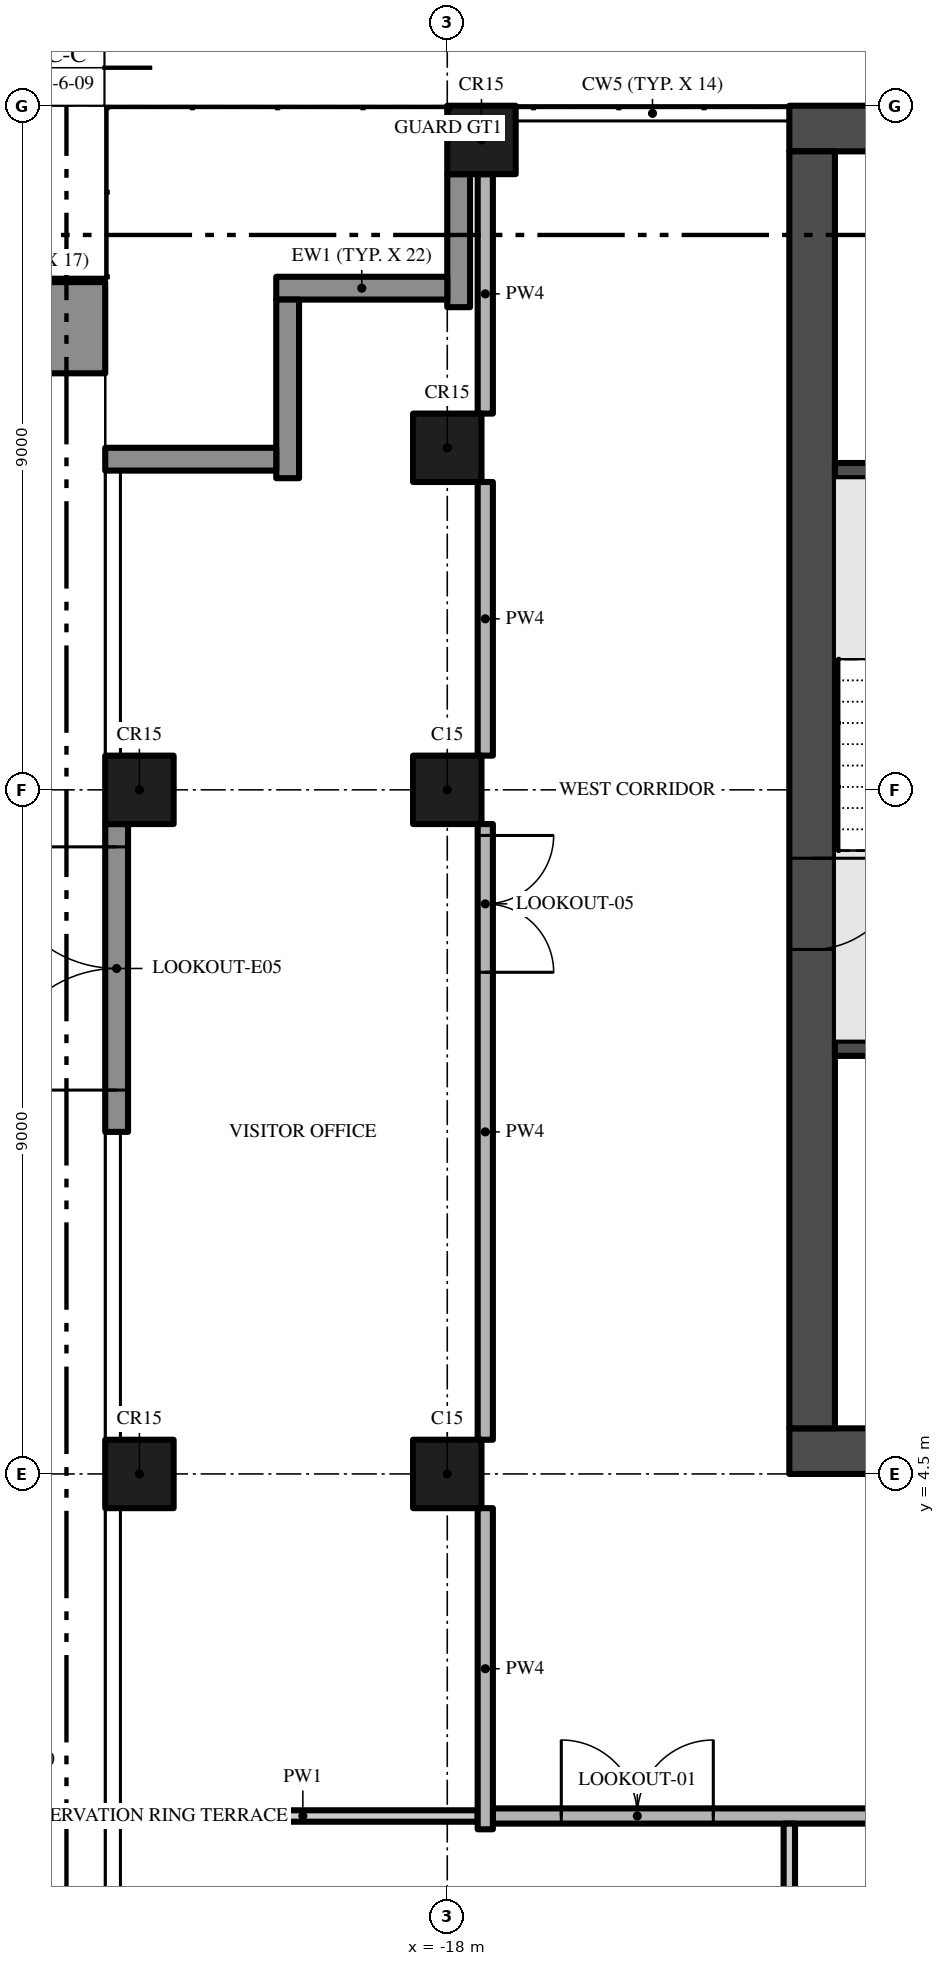
"""IFC4 building model, lengths in metres.
Left out: names, types, materials, properties, quantities, classifications, styles, units other than length and angle.
Written with IfcOpenShell. Run it as: python <this file> out.ifc"""

import sys

from ifc_helpers import new_model, si_unit, direction, frame, frame_2d, origin, origin_2d, place, context, subcontext, project, spatial, rectangle, extrude, element, fill, save


model = new_model("IFC4")
c1 = context("Model", 3, precision=1e-05, world=origin(), true_north=direction((0.0, 1.0)))
c2 = subcontext(c1, "Body", "Model", "MODEL_VIEW")
j1 = project(units=[si_unit("LENGTHUNIT", "METRE"), si_unit("PLANEANGLEUNIT", "RADIAN")], contexts=[c1])
p1 = place(None, origin())
s1 = spatial("IfcSite", under=j1, at=p1, CompositionType="ELEMENT")
p2 = place(p1, origin())
s2 = spatial("IfcBuilding", under=s1, at=p2, CompositionType="ELEMENT")
p3 = place(p2, frame((0.0, 0.0, 297.4)))
s3 = spatial("IfcBuildingStorey", under=s2, at=p3, CompositionType="ELEMENT", Elevation=297.4)
p4 = place(p3, frame((-13.5, 4.8, -0.3), z_axis=(0.0, 0.0, 1.0), x_axis=(1.0, 0.0, 0.0)))
e1 = element("IfcWall", 1, at=p4, inside=s3, PredefinedType="SHEAR", context=c2, shape_type="SweptSolid", body=[
    extrude(rectangle(XDim=27.0, YDim=0.6, at=frame_2d((13.5, 0.0))), origin(), (0.0, 0.0, 1.0), 5.95),
])
p5 = place(p4, frame((12.0, 0.0, 0.3)))
e2 = element("IfcOpeningElement", 2, at=p5, cuts=e1, PredefinedType="OPENING", context=c2, shape_type="SweptSolid", body=[
    extrude(rectangle(XDim=3.0, YDim=2.4, at=frame_2d((1.5, 1.2))), frame((0.0, 0.31, 0.0), z_axis=(0.0, -1.0, 0.0), x_axis=(1.0, 0.0, 0.0)), (0.0, 0.0, 1.0), 0.62),
])
p6 = place(p4, frame((4.9, 0.0, 0.3)))
e3 = element("IfcOpeningElement", 3, at=p6, cuts=e1, PredefinedType="OPENING", context=c2, shape_type="SweptSolid", body=[
    extrude(rectangle(XDim=1.2, YDim=2.2, at=frame_2d((0.6, 1.1))), frame((0.0, 0.31, 0.0), z_axis=(0.0, -1.0, 0.0), x_axis=(1.0, 0.0, 0.0)), (0.0, 0.0, 1.0), 0.62),
])
p7 = place(p4, frame((20.75, 0.0, 0.3)))
e4 = element("IfcOpeningElement", 4, at=p7, cuts=e1, PredefinedType="OPENING", context=c2, shape_type="SweptSolid", body=[
    extrude(rectangle(XDim=1.5, YDim=2.2, at=frame_2d((0.75, 1.1))), frame((0.0, 0.31, 0.0), z_axis=(0.0, -1.0, 0.0), x_axis=(1.0, 0.0, 0.0)), (0.0, 0.0, 1.0), 0.62),
])
p8 = place(p4, frame((17.4, 0.0, 0.3)))
e5 = element("IfcOpeningElement", 5, at=p8, cuts=e1, PredefinedType="OPENING", context=c2, shape_type="SweptSolid", body=[
    extrude(rectangle(XDim=1.2, YDim=2.2, at=frame_2d((0.6, 1.1))), frame((0.0, 0.31, 0.0), z_axis=(0.0, -1.0, 0.0), x_axis=(1.0, 0.0, 0.0)), (0.0, 0.0, 1.0), 0.62),
])
p9 = place(p3, frame((13.5, 22.2, -0.3), z_axis=(0.0, 0.0, 1.0), x_axis=(-1.0, 0.0, 0.0)))
e6 = element("IfcWall", 6, at=p9, inside=s3, PredefinedType="SHEAR", context=c2, shape_type="SweptSolid", body=[
    extrude(rectangle(XDim=27.0, YDim=0.6, at=frame_2d((13.5, 0.0))), origin(), (0.0, 0.0, 1.0), 5.95),
])
p10 = place(p3, frame((-13.2, 21.9, -0.3), z_axis=(0.0, 0.0, 1.0), x_axis=(0.0, -1.0, 0.0)))
e7 = element("IfcWall", 7, at=p10, inside=s3, PredefinedType="SHEAR", context=c2, shape_type="SweptSolid", body=[
    extrude(rectangle(XDim=16.8, YDim=0.6, at=frame_2d((8.4, 0.0))), origin(), (0.0, 0.0, 1.0), 5.95),
])
p11 = place(p10, frame((9.3, 0.0, 0.3)))
e8 = element("IfcOpeningElement", 8, at=p11, cuts=e7, PredefinedType="OPENING", context=c2, shape_type="SweptSolid", body=[
    extrude(rectangle(XDim=1.2, YDim=2.2, at=frame_2d((0.6, 1.1))), frame((0.0, 0.31, 0.0), z_axis=(0.0, -1.0, 0.0), x_axis=(1.0, 0.0, 0.0)), (0.0, 0.0, 1.0), 0.62),
])
for number, where, z_axis, x_axis in (
    (9, (-18.0, 13.5, 0.0), (0.0, 0.0, 1.0), (1.0, 0.0, 0.0)),
    (10, (-17.55, 22.05, 0.0), (0.0, 0.0, 1.0), (1.0, 0.0, 0.0)),
    (11, (-18.0, 4.5, 0.0), (0.0, 0.0, 1.0), (1.0, 0.0, 0.0)),
    (12, (-22.05, 13.5, 0.0), (0.0, 0.0, 1.0), (1.0, 0.0, 0.0)),
    (13, (-18.0, 18.0, 0.0), (0.0, 0.0, 1.0), (1.0, 0.0, 0.0)),
    (14, (-22.05, 4.5, 0.0), (0.0, 0.0, 1.0), (1.0, 0.0, 0.0)),
):
    element("IfcColumn", number, at=place(p3, frame(where, z_axis=z_axis, x_axis=x_axis)), inside=s3, PredefinedType="COLUMN", context=c2, shape_type="SweptSolid", body=[
        extrude(rectangle(XDim=0.9, YDim=0.9, at=origin_2d()), origin(), (0.0, 0.0, 1.0), 5.65),
    ])
p12 = place(p3, frame((-17.85, 19.85, 0.0), z_axis=(0.0, 0.0, 1.0), x_axis=(0.0, 1.0, 0.0)))
e15 = element("IfcWall", 15, at=p12, inside=s3, PredefinedType="SOLIDWALL", context=c2, shape_type="SweptSolid", body=[
    extrude(rectangle(XDim=1.75, YDim=0.3, at=frame_2d((0.875, 0.0))), origin(), (0.0, 0.0, 1.0), 5.65),
])
p13 = place(p3, frame((-20.25, 20.1, 0.0), z_axis=(0.0, 0.0, 1.0), x_axis=(1.0, 0.0, 0.0)))
e16 = element("IfcWall", 16, at=p13, inside=s3, PredefinedType="SOLIDWALL", context=c2, shape_type="SweptSolid", body=[
    extrude(rectangle(XDim=2.25, YDim=0.3, at=frame_2d((1.125, 0.0))), origin(), (0.0, 0.0, 1.0), 5.65),
])
p14 = place(p3, frame((-20.1, 17.6, 0.0), z_axis=(0.0, 0.0, 1.0), x_axis=(0.0, 1.0, 0.0)))
e17 = element("IfcWall", 17, at=p14, inside=s3, PredefinedType="SOLIDWALL", context=c2, shape_type="SweptSolid", body=[
    extrude(rectangle(XDim=2.35, YDim=0.3, at=frame_2d((1.175, 0.0))), origin(), (0.0, 0.0, 1.0), 5.65),
])
p15 = place(p3, frame((-22.5, 17.85, 0.0), z_axis=(0.0, 0.0, 1.0), x_axis=(1.0, 0.0, 0.0)))
e18 = element("IfcWall", 18, at=p15, inside=s3, PredefinedType="SOLIDWALL", context=c2, shape_type="SweptSolid", body=[
    extrude(rectangle(XDim=2.25, YDim=0.3, at=frame_2d((1.125, 0.0))), origin(), (0.0, 0.0, 1.0), 5.65),
])
p16 = place(p3, frame((-22.35, 9.0, 0.0), z_axis=(0.0, 0.0, 1.0), x_axis=(0.0, 1.0, 0.0)))
e19 = element("IfcWall", 19, at=p16, inside=s3, PredefinedType="SOLIDWALL", context=c2, shape_type="SweptSolid", body=[
    extrude(rectangle(XDim=4.05, YDim=0.3, at=frame_2d((2.025, 0.0))), origin(), (0.0, 0.0, 1.0), 5.65),
])
p17 = place(p16, frame((0.55, 0.0, 0.0)))
e20 = element("IfcOpeningElement", 20, at=p17, cuts=e19, PredefinedType="OPENING", context=c2, shape_type="SweptSolid", body=[
    extrude(rectangle(XDim=3.2, YDim=2.4, at=frame_2d((1.6, 1.2))), frame((0.0, 0.16, 0.0), z_axis=(0.0, -1.0, 0.0), x_axis=(1.0, 0.0, 0.0)), (0.0, 0.0, 1.0), 0.32),
])
p18 = place(p3, frame((-22.5, 19.58, 0.0), z_axis=(0.0, 0.0, 1.0), x_axis=(-1.0, 0.0, 0.0)))
e21 = element("IfcWall", 21, at=p18, inside=s3, PredefinedType="USERDEFINED", context=c2, shape_type="SweptSolid", body=[
    extrude(rectangle(XDim=2.18, YDim=1.2, at=frame_2d((1.09, 0.0))), origin(), (0.0, 0.0, 1.0), 0.9),
])
for number, where, z_axis, x_axis in (
    (22, (-12.9, 10.1, 0.0), (0.0, 0.0, 1.0), (1.0, 0.0, 0.0)),
    (23, (-12.9, 17.7, 0.0), (0.0, 0.0, 1.0), (1.0, 0.0, 0.0)),
):
    element("IfcWall", number, at=place(p3, frame(where, z_axis=z_axis, x_axis=x_axis)), inside=s3, PredefinedType="SHEAR", context=c2, shape_type="SweptSolid", body=[
        extrude(rectangle(XDim=3.25, YDim=0.2, at=frame_2d((1.625, 0.0))), origin(), (0.0, 0.0, 1.0), 5.65),
    ])
p19 = place(p3, frame((-17.4, 0.0, 0.0), z_axis=(0.0, 0.0, 1.0), x_axis=(1.0, 0.0, 0.0)))
e24 = element("IfcWall", 24, at=p19, inside=s3, PredefinedType="PARTITIONING", context=c2, shape_type="SweptSolid", body=[
    extrude(rectangle(XDim=34.8, YDim=0.2, at=frame_2d((17.4, 0.0))), origin(), (0.0, 0.0, 1.0), 5.65),
])
p20 = place(p19, frame((0.9, 0.0, 0.0)))
e25 = element("IfcOpeningElement", 25, at=p20, cuts=e24, PredefinedType="OPENING", context=c2, shape_type="SweptSolid", body=[
    extrude(rectangle(XDim=2.0, YDim=2.4, at=frame_2d((1.0, 1.2))), frame((0.0, 0.11, 0.0), z_axis=(0.0, -1.0, 0.0), x_axis=(1.0, 0.0, 0.0)), (0.0, 0.0, 1.0), 0.22),
])
p21 = place(p19, frame((7.4, 0.0, 0.0)))
e26 = element("IfcOpeningElement", 26, at=p21, cuts=e24, PredefinedType="OPENING", context=c2, shape_type="SweptSolid", body=[
    extrude(rectangle(XDim=2.0, YDim=2.4, at=frame_2d((1.0, 1.2))), frame((0.0, 0.11, 0.0), z_axis=(0.0, -1.0, 0.0), x_axis=(1.0, 0.0, 0.0)), (0.0, 0.0, 1.0), 0.22),
])
p22 = place(p19, frame((18.65, 0.0, 0.0)))
e27 = element("IfcOpeningElement", 27, at=p22, cuts=e24, PredefinedType="OPENING", context=c2, shape_type="SweptSolid", body=[
    extrude(rectangle(XDim=2.0, YDim=2.4, at=frame_2d((1.0, 1.2))), frame((0.0, 0.11, 0.0), z_axis=(0.0, -1.0, 0.0), x_axis=(1.0, 0.0, 0.0)), (0.0, 0.0, 1.0), 0.22),
])
p23 = place(p19, frame((29.65, 0.0, 0.0)))
e28 = element("IfcOpeningElement", 28, at=p23, cuts=e24, PredefinedType="OPENING", context=c2, shape_type="SweptSolid", body=[
    extrude(rectangle(XDim=2.0, YDim=2.4, at=frame_2d((1.0, 1.2))), frame((0.0, 0.11, 0.0), z_axis=(0.0, -1.0, 0.0), x_axis=(1.0, 0.0, 0.0)), (0.0, 0.0, 1.0), 0.22),
])
p24 = place(p3, frame((-22.2, 0.0, 0.0), z_axis=(0.0, 0.0, 1.0), x_axis=(1.0, 0.0, 0.0)))
e29 = element("IfcWall", 29, at=p24, inside=s3, PredefinedType="PARTITIONING", context=c2, shape_type="SweptSolid", body=[
    extrude(rectangle(XDim=4.6, YDim=0.15, at=frame_2d((2.3, 0.0))), origin(), (0.0, 0.0, 1.0), 5.65),
])
p25 = place(p3, frame((-17.5, -0.175, 0.0), z_axis=(0.0, 0.0, 1.0), x_axis=(0.0, 1.0, 0.0)))
e30 = element("IfcWall", 30, at=p25, inside=s3, PredefinedType="PARTITIONING", context=c2, shape_type="SweptSolid", body=[
    extrude(rectangle(XDim=4.225, YDim=0.2, at=frame_2d((2.112, 0.0))), origin(), (0.0, 0.0, 1.0), 5.65),
])
p26 = place(p3, frame((-17.5, 13.05, 0.0), z_axis=(0.0, 0.0, 1.0), x_axis=(0.0, -1.0, 0.0)))
e31 = element("IfcWall", 31, at=p26, inside=s3, PredefinedType="PARTITIONING", context=c2, shape_type="SweptSolid", body=[
    extrude(rectangle(XDim=8.1, YDim=0.2, at=frame_2d((4.05, 0.0))), origin(), (0.0, 0.0, 1.0), 5.65),
])
p27 = place(p26, frame((0.15, 0.0, 0.0)))
e32 = element("IfcOpeningElement", 32, at=p27, cuts=e31, PredefinedType="OPENING", context=c2, shape_type="SweptSolid", body=[
    extrude(rectangle(XDim=1.8, YDim=2.4, at=frame_2d((0.9, 1.2))), frame((0.0, 0.11, 0.0), z_axis=(0.0, -1.0, 0.0), x_axis=(1.0, 0.0, 0.0)), (0.0, 0.0, 1.0), 0.22),
])
p28 = place(p3, frame((-17.5, 13.95, 0.0), z_axis=(0.0, 0.0, 1.0), x_axis=(0.0, 1.0, 0.0)))
e33 = element("IfcWall", 33, at=p28, inside=s3, PredefinedType="PARTITIONING", context=c2, shape_type="SweptSolid", body=[
    extrude(rectangle(XDim=3.6, YDim=0.2, at=frame_2d((1.8, 0.0))), origin(), (0.0, 0.0, 1.0), 5.65),
])
p29 = place(p3, frame((-17.5, 18.45, 0.0), z_axis=(0.0, 0.0, 1.0), x_axis=(0.0, 1.0, 0.0)))
e34 = element("IfcWall", 34, at=p29, inside=s3, PredefinedType="PARTITIONING", context=c2, shape_type="SweptSolid", body=[
    extrude(rectangle(XDim=3.15, YDim=0.2, at=frame_2d((1.575, 0.0))), origin(), (0.0, 0.0, 1.0), 5.65),
])
p30 = place(p3, frame((-13.5, -17.7, 0.0), z_axis=(0.0, 0.0, 1.0), x_axis=(0.0, 1.0, 0.0)))
e35 = element("IfcWall", 35, at=p30, inside=s3, PredefinedType="PARTITIONING", context=c2, shape_type="SweptSolid", body=[
    extrude(rectangle(XDim=17.6, YDim=0.15, at=frame_2d((8.8, 0.0))), origin(), (0.0, 0.0, 1.0), 5.65),
])
p31 = place(p17, origin())
e36 = element("IfcDoor", 36, at=p31, inside=s3, OperationType="SINGLE_SWING_LEFT", PredefinedType="DOOR", context=c2, shape_type="SweptSolid", body=[
    extrude(rectangle(XDim=3.2, YDim=2.4, at=frame_2d((1.6, 1.2))), frame((0.0, 0.025, 0.0), z_axis=(0.0, -1.0, 0.0), x_axis=(1.0, 0.0, 0.0)), (0.0, 0.0, 1.0), 0.05),
])
fill(e20, e36)
p32 = place(p11, frame((1.2, 0.0, 0.0), z_axis=(0.0, 0.0, 1.0), x_axis=(-1.0, 0.0, 0.0)))
e37 = element("IfcDoor", 37, at=p32, inside=s3, OperationType="SINGLE_SWING_RIGHT", PredefinedType="DOOR", context=c2, shape_type="SweptSolid", body=[
    extrude(rectangle(XDim=1.2, YDim=2.2, at=frame_2d((0.6, 1.1))), frame((0.0, 0.025, 0.0), z_axis=(0.0, -1.0, 0.0), x_axis=(1.0, 0.0, 0.0)), (0.0, 0.0, 1.0), 0.05),
])
fill(e8, e37)
p33 = place(p20, origin())
e38 = element("IfcDoor", 38, at=p33, inside=s3, OperationType="DOUBLE_DOOR_SINGLE_SWING", PredefinedType="DOOR", context=c2, shape_type="SweptSolid", body=[
    extrude(rectangle(XDim=2.0, YDim=2.4, at=frame_2d((1.0, 1.2))), frame((0.0, 0.025, 0.0), z_axis=(0.0, -1.0, 0.0), x_axis=(1.0, 0.0, 0.0)), (0.0, 0.0, 1.0), 0.05),
])
fill(e25, e38)
p34 = place(p27, origin())
e39 = element("IfcDoor", 39, at=p34, inside=s3, OperationType="DOUBLE_DOOR_SINGLE_SWING", PredefinedType="DOOR", context=c2, shape_type="SweptSolid", body=[
    extrude(rectangle(XDim=1.8, YDim=2.4, at=frame_2d((0.9, 1.2))), frame((0.0, 0.025, 0.0), z_axis=(0.0, -1.0, 0.0), x_axis=(1.0, 0.0, 0.0)), (0.0, 0.0, 1.0), 0.05),
])
fill(e32, e39)
save(model, sys.argv[1])
